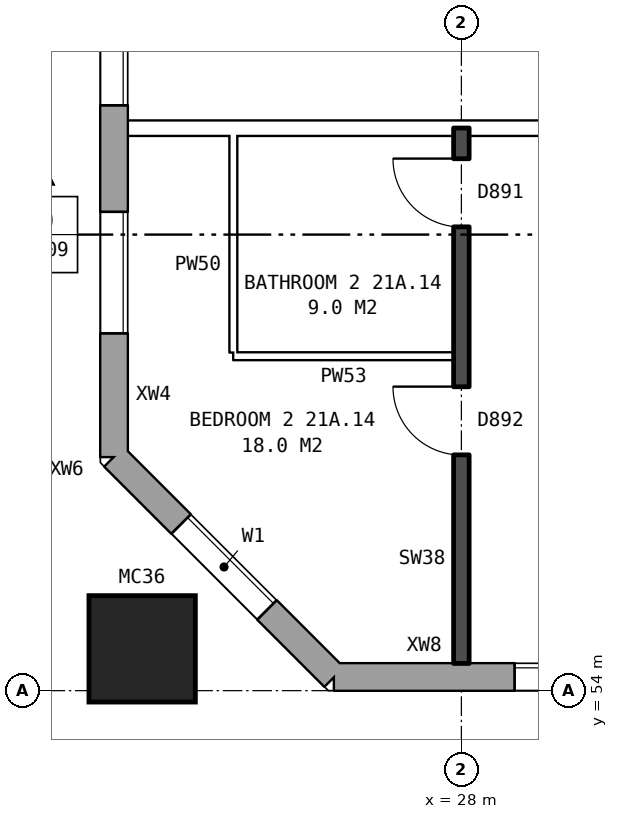
"""IFC4 building model, lengths in metres.
Left out: names, types, materials, properties, quantities, classifications, styles, units other than length and angle.
Written with IfcOpenShell. Run it as: python <this file> out.ifc"""

import sys

from ifc_helpers import new_model, si_unit, direction, frame, frame_2d, origin, origin_2d, place, context, subcontext, project, spatial, rectangle, hollow_rectangle, extrude, element, fill, save


model = new_model("IFC4")
c1 = context("Model", 3, precision=1e-05, world=origin(), true_north=direction((0.0, 1.0)))
c2 = subcontext(c1, "Body", "Model", "MODEL_VIEW")
j1 = project(units=[si_unit("LENGTHUNIT", "METRE"), si_unit("PLANEANGLEUNIT", "RADIAN")], contexts=[c1])
p1 = place(None, origin())
s1 = spatial("IfcSite", under=j1, at=p1, CompositionType="ELEMENT")
p2 = place(p1, origin())
s2 = spatial("IfcBuilding", under=s1, at=p2, CompositionType="ELEMENT")
p3 = place(p2, frame((0.0, 0.0, 77.8)))
s3 = spatial("IfcBuildingStorey", under=s2, at=p3, CompositionType="ELEMENT", Elevation=77.8)
p4 = place(p3, frame((23.8, 54.55, 0.0), z_axis=(0.0, 0.0, 1.0), x_axis=(1.0, 0.0, 0.0)))
e1 = element("IfcColumn", 1, at=p4, inside=s3, PredefinedType="COLUMN", context=c2, shape_type="SweptSolid", body=[
    extrude(hollow_rectangle(XDim=1.4, YDim=1.4, WallThickness=0.075, at=origin_2d()), origin(), (0.0, 0.0, 1.0), 3.1),
])
p5 = place(p3, frame((23.43, 57.075, 0.0), z_axis=(0.0, 0.0, 1.0), x_axis=(0.707106781187, -0.707106781187, 0.0)))
e2 = element("IfcWall", 2, at=p5, inside=s3, PredefinedType="STANDARD", context=c2, shape_type="SweptSolid", body=[
    extrude(rectangle(XDim=4.094, YDim=0.36, at=frame_2d((2.047, 0.0))), origin(), (0.0, 0.0, 1.0), 2.85),
])
p6 = place(p5, frame((1.247, 0.0, 0.8)))
e3 = element("IfcOpeningElement", 3, at=p6, cuts=e2, PredefinedType="OPENING", context=c2, shape_type="SweptSolid", body=[
    extrude(rectangle(XDim=1.6, YDim=1.8, at=frame_2d((0.8, 0.9))), frame((0.0, 0.19, 0.0), z_axis=(0.0, -1.0, 0.0), x_axis=(1.0, 0.0, 0.0)), (0.0, 0.0, 1.0), 0.38),
])
p7 = place(p3, frame((26.325, 54.18, 0.0), z_axis=(0.0, 0.0, 1.0), x_axis=(1.0, 0.0, 0.0)))
e4 = element("IfcWall", 4, at=p7, inside=s3, PredefinedType="STANDARD", context=c2, shape_type="SweptSolid", body=[
    extrude(rectangle(XDim=46.601, YDim=0.36, at=frame_2d((23.3, 0.0))), origin(), (0.0, 0.0, 1.0), 2.85),
])
p8 = place(p7, frame((2.375, 0.0, 0.8)))
e5 = element("IfcOpeningElement", 5, at=p8, cuts=e4, PredefinedType="OPENING", context=c2, shape_type="SweptSolid", body=[
    extrude(rectangle(XDim=1.6, YDim=1.8, at=frame_2d((0.8, 0.9))), frame((0.0, 0.19, 0.0), z_axis=(0.0, -1.0, 0.0), x_axis=(1.0, 0.0, 0.0)), (0.0, 0.0, 1.0), 0.38),
])
p9 = place(p7, frame((5.375, 0.0, 0.8)))
e6 = element("IfcOpeningElement", 6, at=p9, cuts=e4, PredefinedType="OPENING", context=c2, shape_type="SweptSolid", body=[
    extrude(rectangle(XDim=1.6, YDim=1.8, at=frame_2d((0.8, 0.9))), frame((0.0, 0.19, 0.0), z_axis=(0.0, -1.0, 0.0), x_axis=(1.0, 0.0, 0.0)), (0.0, 0.0, 1.0), 0.38),
])
p10 = place(p7, frame((7.875, 0.0, 0.8)))
e7 = element("IfcOpeningElement", 7, at=p10, cuts=e4, PredefinedType="OPENING", context=c2, shape_type="SweptSolid", body=[
    extrude(rectangle(XDim=1.6, YDim=1.8, at=frame_2d((0.8, 0.9))), frame((0.0, 0.19, 0.0), z_axis=(0.0, -1.0, 0.0), x_axis=(1.0, 0.0, 0.0)), (0.0, 0.0, 1.0), 0.38),
])
p11 = place(p7, frame((11.725, 0.0, 0.65)))
e8 = element("IfcOpeningElement", 8, at=p11, cuts=e4, PredefinedType="OPENING", context=c2, shape_type="SweptSolid", body=[
    extrude(rectangle(XDim=0.8, YDim=0.9, at=frame_2d((0.4, 0.45))), frame((0.0, 0.19, 0.0), z_axis=(0.0, -1.0, 0.0), x_axis=(1.0, 0.0, 0.0)), (0.0, 0.0, 1.0), 0.38),
])
p12 = place(p7, frame((14.375, 0.0, 0.8)))
e9 = element("IfcOpeningElement", 9, at=p12, cuts=e4, PredefinedType="OPENING", context=c2, shape_type="SweptSolid", body=[
    extrude(rectangle(XDim=1.6, YDim=1.8, at=frame_2d((0.8, 0.9))), frame((0.0, 0.19, 0.0), z_axis=(0.0, -1.0, 0.0), x_axis=(1.0, 0.0, 0.0)), (0.0, 0.0, 1.0), 0.38),
])
p13 = place(p7, frame((17.375, 0.0, 0.8)))
e10 = element("IfcOpeningElement", 10, at=p13, cuts=e4, PredefinedType="OPENING", context=c2, shape_type="SweptSolid", body=[
    extrude(rectangle(XDim=1.6, YDim=1.8, at=frame_2d((0.8, 0.9))), frame((0.0, 0.19, 0.0), z_axis=(0.0, -1.0, 0.0), x_axis=(1.0, 0.0, 0.0)), (0.0, 0.0, 1.0), 0.38),
])
p14 = place(p7, frame((20.375, 0.0, 0.8)))
e11 = element("IfcOpeningElement", 11, at=p14, cuts=e4, PredefinedType="OPENING", context=c2, shape_type="SweptSolid", body=[
    extrude(rectangle(XDim=1.6, YDim=1.8, at=frame_2d((0.8, 0.9))), frame((0.0, 0.19, 0.0), z_axis=(0.0, -1.0, 0.0), x_axis=(1.0, 0.0, 0.0)), (0.0, 0.0, 1.0), 0.38),
])
p15 = place(p7, frame((23.375, 0.0, 0.8)))
e12 = element("IfcOpeningElement", 12, at=p15, cuts=e4, PredefinedType="OPENING", context=c2, shape_type="SweptSolid", body=[
    extrude(rectangle(XDim=1.6, YDim=1.8, at=frame_2d((0.8, 0.9))), frame((0.0, 0.19, 0.0), z_axis=(0.0, -1.0, 0.0), x_axis=(1.0, 0.0, 0.0)), (0.0, 0.0, 1.0), 0.38),
])
p16 = place(p7, frame((26.375, 0.0, 0.8)))
e13 = element("IfcOpeningElement", 13, at=p16, cuts=e4, PredefinedType="OPENING", context=c2, shape_type="SweptSolid", body=[
    extrude(rectangle(XDim=1.6, YDim=1.8, at=frame_2d((0.8, 0.9))), frame((0.0, 0.19, 0.0), z_axis=(0.0, -1.0, 0.0), x_axis=(1.0, 0.0, 0.0)), (0.0, 0.0, 1.0), 0.38),
])
p17 = place(p7, frame((29.375, 0.0, 0.8)))
e14 = element("IfcOpeningElement", 14, at=p17, cuts=e4, PredefinedType="OPENING", context=c2, shape_type="SweptSolid", body=[
    extrude(rectangle(XDim=1.6, YDim=1.8, at=frame_2d((0.8, 0.9))), frame((0.0, 0.19, 0.0), z_axis=(0.0, -1.0, 0.0), x_axis=(1.0, 0.0, 0.0)), (0.0, 0.0, 1.0), 0.38),
])
p18 = place(p7, frame((32.375, 0.0, 0.8)))
e15 = element("IfcOpeningElement", 15, at=p18, cuts=e4, PredefinedType="OPENING", context=c2, shape_type="SweptSolid", body=[
    extrude(rectangle(XDim=1.6, YDim=1.8, at=frame_2d((0.8, 0.9))), frame((0.0, 0.19, 0.0), z_axis=(0.0, -1.0, 0.0), x_axis=(1.0, 0.0, 0.0)), (0.0, 0.0, 1.0), 0.38),
])
p19 = place(p7, frame((34.825, 0.0, 0.15)))
e16 = element("IfcOpeningElement", 16, at=p19, cuts=e4, PredefinedType="OPENING", context=c2, shape_type="SweptSolid", body=[
    extrude(rectangle(XDim=0.6, YDim=0.9, at=frame_2d((0.3, 0.45))), frame((0.0, 0.19, 0.0), z_axis=(0.0, -1.0, 0.0), x_axis=(1.0, 0.0, 0.0)), (0.0, 0.0, 1.0), 0.38),
])
p20 = place(p7, frame((38.375, 0.0, 0.8)))
e17 = element("IfcOpeningElement", 17, at=p20, cuts=e4, PredefinedType="OPENING", context=c2, shape_type="SweptSolid", body=[
    extrude(rectangle(XDim=1.6, YDim=1.8, at=frame_2d((0.8, 0.9))), frame((0.0, 0.19, 0.0), z_axis=(0.0, -1.0, 0.0), x_axis=(1.0, 0.0, 0.0)), (0.0, 0.0, 1.0), 0.38),
])
p21 = place(p7, frame((41.375, 0.0, 0.8)))
e18 = element("IfcOpeningElement", 18, at=p21, cuts=e4, PredefinedType="OPENING", context=c2, shape_type="SweptSolid", body=[
    extrude(rectangle(XDim=1.6, YDim=1.8, at=frame_2d((0.8, 0.9))), frame((0.0, 0.19, 0.0), z_axis=(0.0, -1.0, 0.0), x_axis=(1.0, 0.0, 0.0)), (0.0, 0.0, 1.0), 0.38),
])
p22 = place(p7, frame((44.375, 0.0, 0.8)))
e19 = element("IfcOpeningElement", 19, at=p22, cuts=e4, PredefinedType="OPENING", context=c2, shape_type="SweptSolid", body=[
    extrude(rectangle(XDim=1.6, YDim=1.8, at=frame_2d((0.8, 0.9))), frame((0.0, 0.19, 0.0), z_axis=(0.0, -1.0, 0.0), x_axis=(1.0, 0.0, 0.0)), (0.0, 0.0, 1.0), 0.38),
])
p23 = place(p7, frame((9.775, 0.0, 1.5)))
e20 = element("IfcOpeningElement", 20, at=p23, cuts=e4, PredefinedType="OPENING", context=c2, shape_type="SweptSolid", body=[
    extrude(rectangle(XDim=0.6, YDim=0.9, at=frame_2d((0.3, 0.45))), frame((0.0, 0.19, 0.0), z_axis=(0.0, -1.0, 0.0), x_axis=(1.0, 0.0, 0.0)), (0.0, 0.0, 1.0), 0.38),
])
p24 = place(p7, frame((12.825, 0.0, 0.65)))
e21 = element("IfcOpeningElement", 21, at=p24, cuts=e4, PredefinedType="OPENING", context=c2, shape_type="SweptSolid", body=[
    extrude(rectangle(XDim=0.6, YDim=1.8, at=frame_2d((0.3, 0.9))), frame((0.0, 0.19, 0.0), z_axis=(0.0, -1.0, 0.0), x_axis=(1.0, 0.0, 0.0)), (0.0, 0.0, 1.0), 0.38),
])
p25 = place(p7, frame((36.025, 0.0, 1.65)))
e22 = element("IfcOpeningElement", 22, at=p25, cuts=e4, PredefinedType="OPENING", context=c2, shape_type="SweptSolid", body=[
    extrude(rectangle(XDim=1.4, YDim=0.9, at=frame_2d((0.7, 0.45))), frame((0.0, 0.19, 0.0), z_axis=(0.0, -1.0, 0.0), x_axis=(1.0, 0.0, 0.0)), (0.0, 0.0, 1.0), 0.38),
])
p26 = place(p3, frame((23.43, 82.925, 0.0), z_axis=(0.0, 0.0, 1.0), x_axis=(0.0, -1.0, 0.0)))
e23 = element("IfcWall", 23, at=p26, inside=s3, PredefinedType="STANDARD", context=c2, shape_type="SweptSolid", body=[
    extrude(rectangle(XDim=25.851, YDim=0.36, at=frame_2d((12.925, 0.0))), origin(), (0.0, 0.0, 1.0), 2.85),
])
p27 = place(p26, frame((1.625, 0.0, 0.8)))
e24 = element("IfcOpeningElement", 24, at=p27, cuts=e23, PredefinedType="OPENING", context=c2, shape_type="SweptSolid", body=[
    extrude(rectangle(XDim=1.6, YDim=1.8, at=frame_2d((0.8, 0.9))), frame((0.0, 0.19, 0.0), z_axis=(0.0, -1.0, 0.0), x_axis=(1.0, 0.0, 0.0)), (0.0, 0.0, 1.0), 0.38),
])
p28 = place(p26, frame((4.625, 0.0, 0.8)))
e25 = element("IfcOpeningElement", 25, at=p28, cuts=e23, PredefinedType="OPENING", context=c2, shape_type="SweptSolid", body=[
    extrude(rectangle(XDim=1.6, YDim=1.8, at=frame_2d((0.8, 0.9))), frame((0.0, 0.19, 0.0), z_axis=(0.0, -1.0, 0.0), x_axis=(1.0, 0.0, 0.0)), (0.0, 0.0, 1.0), 0.38),
])
p29 = place(p26, frame((7.625, 0.0, 0.8)))
e26 = element("IfcOpeningElement", 26, at=p29, cuts=e23, PredefinedType="OPENING", context=c2, shape_type="SweptSolid", body=[
    extrude(rectangle(XDim=1.6, YDim=1.8, at=frame_2d((0.8, 0.9))), frame((0.0, 0.19, 0.0), z_axis=(0.0, -1.0, 0.0), x_axis=(1.0, 0.0, 0.0)), (0.0, 0.0, 1.0), 0.38),
])
p30 = place(p26, frame((6.525, 0.0, 0.8)))
e27 = element("IfcOpeningElement", 27, at=p30, cuts=e23, PredefinedType="OPENING", context=c2, shape_type="SweptSolid", body=[
    extrude(rectangle(XDim=0.8, YDim=1.8, at=frame_2d((0.4, 0.9))), frame((0.0, 0.19, 0.0), z_axis=(0.0, -1.0, 0.0), x_axis=(1.0, 0.0, 0.0)), (0.0, 0.0, 1.0), 0.38),
])
p31 = place(p26, frame((9.525, 0.0, 0.8)))
e28 = element("IfcOpeningElement", 28, at=p31, cuts=e23, PredefinedType="OPENING", context=c2, shape_type="SweptSolid", body=[
    extrude(rectangle(XDim=1.4, YDim=1.2, at=frame_2d((0.7, 0.6))), frame((0.0, 0.19, 0.0), z_axis=(0.0, -1.0, 0.0), x_axis=(1.0, 0.0, 0.0)), (0.0, 0.0, 1.0), 0.38),
])
p32 = place(p26, frame((16.625, 0.0, 0.8)))
e29 = element("IfcOpeningElement", 29, at=p32, cuts=e23, PredefinedType="OPENING", context=c2, shape_type="SweptSolid", body=[
    extrude(rectangle(XDim=1.6, YDim=1.8, at=frame_2d((0.8, 0.9))), frame((0.0, 0.19, 0.0), z_axis=(0.0, -1.0, 0.0), x_axis=(1.0, 0.0, 0.0)), (0.0, 0.0, 1.0), 0.38),
])
p33 = place(p26, frame((19.625, 0.0, 0.8)))
e30 = element("IfcOpeningElement", 30, at=p33, cuts=e23, PredefinedType="OPENING", context=c2, shape_type="SweptSolid", body=[
    extrude(rectangle(XDim=1.6, YDim=1.8, at=frame_2d((0.8, 0.9))), frame((0.0, 0.19, 0.0), z_axis=(0.0, -1.0, 0.0), x_axis=(1.0, 0.0, 0.0)), (0.0, 0.0, 1.0), 0.38),
])
p34 = place(p26, frame((22.625, 0.0, 0.8)))
e31 = element("IfcOpeningElement", 31, at=p34, cuts=e23, PredefinedType="OPENING", context=c2, shape_type="SweptSolid", body=[
    extrude(rectangle(XDim=1.6, YDim=1.8, at=frame_2d((0.8, 0.9))), frame((0.0, 0.19, 0.0), z_axis=(0.0, -1.0, 0.0), x_axis=(1.0, 0.0, 0.0)), (0.0, 0.0, 1.0), 0.38),
])
p35 = place(p26, frame((12.275, 0.0, 0.8)))
e32 = element("IfcOpeningElement", 32, at=p35, cuts=e23, PredefinedType="OPENING", context=c2, shape_type="SweptSolid", body=[
    extrude(rectangle(XDim=1.2, YDim=1.8, at=frame_2d((0.6, 0.9))), frame((0.0, 0.19, 0.0), z_axis=(0.0, -1.0, 0.0), x_axis=(1.0, 0.0, 0.0)), (0.0, 0.0, 1.0), 0.38),
])
p36 = place(p26, frame((14.475, 0.0, 0.8)))
e33 = element("IfcOpeningElement", 33, at=p36, cuts=e23, PredefinedType="OPENING", context=c2, shape_type="SweptSolid", body=[
    extrude(rectangle(XDim=1.2, YDim=0.9, at=frame_2d((0.6, 0.45))), frame((0.0, 0.19, 0.0), z_axis=(0.0, -1.0, 0.0), x_axis=(1.0, 0.0, 0.0)), (0.0, 0.0, 1.0), 0.38),
])
p37 = place(p26, frame((18.525, 0.0, 0.8)))
e34 = element("IfcOpeningElement", 34, at=p37, cuts=e23, PredefinedType="OPENING", context=c2, shape_type="SweptSolid", body=[
    extrude(rectangle(XDim=0.6, YDim=1.8, at=frame_2d((0.3, 0.9))), frame((0.0, 0.19, 0.0), z_axis=(0.0, -1.0, 0.0), x_axis=(1.0, 0.0, 0.0)), (0.0, 0.0, 1.0), 0.38),
])
p38 = place(p3, frame((25.0, 58.4, 0.0), z_axis=(0.0, 0.0, 1.0), x_axis=(1.0, 0.0, 0.0)))
e35 = element("IfcWall", 35, at=p38, inside=s3, PredefinedType="PARTITIONING", context=c2, shape_type="SweptSolid", body=[
    extrude(rectangle(XDim=2.9, YDim=0.1, at=frame_2d((1.45, 0.0))), origin(), (0.0, 0.0, 1.0), 2.85),
])
p39 = place(p3, frame((23.61, 61.4, 0.0), z_axis=(0.0, 0.0, 1.0), x_axis=(1.0, 0.0, 0.0)))
e36 = element("IfcWall", 36, at=p39, inside=s3, PredefinedType="PARTITIONING", context=c2, shape_type="SweptSolid", body=[
    extrude(rectangle(XDim=22.29, YDim=0.2, at=frame_2d((11.145, 0.0))), origin(), (0.0, 0.0, 1.0), 2.85),
])
p40 = place(p39, frame((18.84, 0.0, 0.0)))
e37 = element("IfcOpeningElement", 37, at=p40, cuts=e36, PredefinedType="OPENING", context=c2, shape_type="SweptSolid", body=[
    extrude(rectangle(XDim=1.0, YDim=2.1, at=frame_2d((0.5, 1.05))), frame((0.0, 0.11, 0.0), z_axis=(0.0, -1.0, 0.0), x_axis=(1.0, 0.0, 0.0)), (0.0, 0.0, 1.0), 0.22),
])
p41 = place(p39, frame((6.89, 0.0, 0.0)))
e38 = element("IfcOpeningElement", 38, at=p41, cuts=e36, PredefinedType="OPENING", context=c2, shape_type="SweptSolid", body=[
    extrude(rectangle(XDim=1.0, YDim=2.1, at=frame_2d((0.5, 1.05))), frame((0.0, 0.11, 0.0), z_axis=(0.0, -1.0, 0.0), x_axis=(1.0, 0.0, 0.0)), (0.0, 0.0, 1.0), 0.22),
])
p42 = place(p3, frame((25.0, 58.45, 0.0), z_axis=(0.0, 0.0, 1.0), x_axis=(0.0, 1.0, 0.0)))
e39 = element("IfcWall", 39, at=p42, inside=s3, PredefinedType="PARTITIONING", context=c2, shape_type="SweptSolid", body=[
    extrude(rectangle(XDim=2.85, YDim=0.1, at=frame_2d((1.425, 0.0))), origin(), (0.0, 0.0, 1.0), 2.85),
])
p43 = place(p3, frame((28.0, 54.36, 0.0), z_axis=(0.0, 0.0, 1.0), x_axis=(0.0, 1.0, 0.0)))
e40 = element("IfcWall", 40, at=p43, inside=s3, PredefinedType="SOLIDWALL", context=c2, shape_type="SweptSolid", body=[
    extrude(rectangle(XDim=7.04, YDim=0.2, at=frame_2d((3.52, 0.0))), origin(), (0.0, 0.0, 1.0), 2.85),
])
p44 = place(p43, frame((2.74, 0.0, 0.0)))
e41 = element("IfcOpeningElement", 41, at=p44, cuts=e40, PredefinedType="OPENING", context=c2, shape_type="SweptSolid", body=[
    extrude(rectangle(XDim=0.9, YDim=2.1, at=frame_2d((0.45, 1.05))), frame((0.0, 0.11, 0.0), z_axis=(0.0, -1.0, 0.0), x_axis=(1.0, 0.0, 0.0)), (0.0, 0.0, 1.0), 0.22),
])
p45 = place(p43, frame((5.74, 0.0, 0.0)))
e42 = element("IfcOpeningElement", 42, at=p45, cuts=e40, PredefinedType="OPENING", context=c2, shape_type="SweptSolid", body=[
    extrude(rectangle(XDim=0.9, YDim=2.1, at=frame_2d((0.45, 1.05))), frame((0.0, 0.11, 0.0), z_axis=(0.0, -1.0, 0.0), x_axis=(1.0, 0.0, 0.0)), (0.0, 0.0, 1.0), 0.22),
])
p46 = place(p6, origin())
e43 = element("IfcWindow", 43, at=p46, inside=s3, PartitioningType="SINGLE_PANEL", PredefinedType="WINDOW", context=c2, shape_type="SweptSolid", body=[
    extrude(rectangle(XDim=1.6, YDim=1.8, at=frame_2d((0.8, 0.9))), frame((0.0, 0.15, 0.0), z_axis=(0.0, -1.0, 0.0), x_axis=(1.0, 0.0, 0.0)), (0.0, 0.0, 1.0), 0.06),
])
fill(e3, e43)
p47 = place(p8, origin())
e44 = element("IfcWindow", 44, at=p47, inside=s3, PartitioningType="SINGLE_PANEL", PredefinedType="WINDOW", context=c2, shape_type="SweptSolid", body=[
    extrude(rectangle(XDim=1.6, YDim=1.8, at=frame_2d((0.8, 0.9))), frame((0.0, 0.15, 0.0), z_axis=(0.0, -1.0, 0.0), x_axis=(1.0, 0.0, 0.0)), (0.0, 0.0, 1.0), 0.06),
])
fill(e5, e44)
p48 = place(p33, origin())
e45 = element("IfcWindow", 45, at=p48, inside=s3, PartitioningType="SINGLE_PANEL", PredefinedType="WINDOW", context=c2, shape_type="SweptSolid", body=[
    extrude(rectangle(XDim=1.6, YDim=1.8, at=frame_2d((0.8, 0.9))), frame((0.0, 0.15, 0.0), z_axis=(0.0, -1.0, 0.0), x_axis=(1.0, 0.0, 0.0)), (0.0, 0.0, 1.0), 0.06),
])
fill(e30, e45)
p49 = place(p34, origin())
e46 = element("IfcWindow", 46, at=p49, inside=s3, PartitioningType="SINGLE_PANEL", PredefinedType="WINDOW", context=c2, shape_type="SweptSolid", body=[
    extrude(rectangle(XDim=1.6, YDim=1.8, at=frame_2d((0.8, 0.9))), frame((0.0, 0.15, 0.0), z_axis=(0.0, -1.0, 0.0), x_axis=(1.0, 0.0, 0.0)), (0.0, 0.0, 1.0), 0.06),
])
fill(e31, e46)
p50 = place(p44, origin())
e47 = element("IfcDoor", 47, at=p50, inside=s3, OperationType="SINGLE_SWING_RIGHT", PredefinedType="DOOR", context=c2, shape_type="SweptSolid", body=[
    extrude(rectangle(XDim=0.9, YDim=2.1, at=frame_2d((0.45, 1.05))), frame((0.0, 0.025, 0.0), z_axis=(0.0, -1.0, 0.0), x_axis=(1.0, 0.0, 0.0)), (0.0, 0.0, 1.0), 0.05),
])
fill(e41, e47)
p51 = place(p45, origin())
e48 = element("IfcDoor", 48, at=p51, inside=s3, OperationType="SINGLE_SWING_RIGHT", PredefinedType="DOOR", context=c2, shape_type="SweptSolid", body=[
    extrude(rectangle(XDim=0.9, YDim=2.1, at=frame_2d((0.45, 1.05))), frame((0.0, 0.025, 0.0), z_axis=(0.0, -1.0, 0.0), x_axis=(1.0, 0.0, 0.0)), (0.0, 0.0, 1.0), 0.05),
])
fill(e42, e48)
save(model, sys.argv[1])
